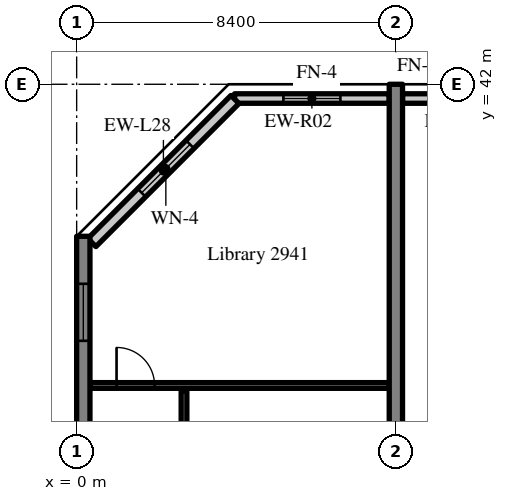
"""IFC4 building model, lengths in metres.
Left out: names, types, materials, properties, quantities, classifications, styles, units other than length and angle.
Written with IfcOpenShell. Run it as: python <this file> out.ifc"""

import sys

from ifc_helpers import new_model, si_unit, direction, frame, frame_2d, origin, place, context, subcontext, project, spatial, rectangle, extrude, source, transform, mapped, element, fill, save


model = new_model("IFC4")
c1 = context("Model", 3, precision=1e-05, world=origin(), true_north=direction((0.0, 1.0)))
c2 = subcontext(c1, "Body", "Model", "MODEL_VIEW")
j1 = project(units=[si_unit("LENGTHUNIT", "METRE"), si_unit("PLANEANGLEUNIT", "RADIAN")], contexts=[c1])
p1 = place(None, origin())
s1 = spatial("IfcSite", under=j1, at=p1, CompositionType="ELEMENT")
p2 = place(p1, origin())
s2 = spatial("IfcBuilding", under=s1, at=p2, CompositionType="ELEMENT")
p3 = place(p2, frame((0.0, 0.0, 121.8)))
s3 = spatial("IfcBuildingStorey", under=s2, at=p3, CompositionType="ELEMENT", Elevation=121.8)
m1 = source(origin(), c2, "Body", "SweptSolid", [
    extrude(rectangle(XDim=16.0, YDim=0.35, at=frame_2d((8.0, 0.0))), origin(), (0.0, 0.0, 1.0), 3.52),
])
p4 = place(p3, frame((0.175, 22.0, 0.0), z_axis=(0.0, 0.0, 1.0), x_axis=(0.0, 1.0, 0.0)))
e1 = element("IfcWall", 1, at=p4, inside=s3, PredefinedType="SHEAR", context=c2, shape_type="MappedRepresentation", body=[
    mapped(m1, transform((0.0, 0.0, 0.0), scale=1.0)),
])
m2 = source(origin(), c2, "Body", "SweptSolid", [
    extrude(rectangle(XDim=1.5, YDim=1.5, at=frame_2d((0.75, 0.75))), frame((0.0, 0.185, 0.0), z_axis=(0.0, -1.0, 0.0), x_axis=(1.0, 0.0, 0.0)), (0.0, 0.0, 1.0), 0.37),
])
p5 = place(p4, frame((1.25, 0.0, 0.9)))
e2 = element("IfcOpeningElement", 2, at=p5, cuts=e1, PredefinedType="OPENING", context=c2, shape_type="MappedRepresentation", body=[
    mapped(m2, transform((0.0, 0.0, 0.0), scale=1.0)),
])
p6 = place(p4, frame((5.25, 0.0, 0.9)))
e3 = element("IfcOpeningElement", 3, at=p6, cuts=e1, PredefinedType="OPENING", context=c2, shape_type="MappedRepresentation", body=[
    mapped(m2, transform((0.0, 0.0, 0.0), scale=1.0)),
])
p7 = place(p4, frame((9.25, 0.0, 0.9)))
e4 = element("IfcOpeningElement", 4, at=p7, cuts=e1, PredefinedType="OPENING", context=c2, shape_type="MappedRepresentation", body=[
    mapped(m2, transform((0.0, 0.0, 0.0), scale=1.0)),
])
p8 = place(p4, frame((13.25, 0.0, 0.9)))
e5 = element("IfcOpeningElement", 5, at=p8, cuts=e1, PredefinedType="OPENING", context=c2, shape_type="MappedRepresentation", body=[
    mapped(m2, transform((0.0, 0.0, 0.0), scale=1.0)),
])
m3 = source(origin(), c2, "Body", "SweptSolid", [
    extrude(rectangle(XDim=20.0, YDim=0.35, at=frame_2d((10.0, 0.0))), origin(), (0.0, 0.0, 1.0), 3.52),
])
p9 = place(p3, frame((8.4, 22.0, 0.0), z_axis=(0.0, 0.0, 1.0), x_axis=(0.0, 1.0, 0.0)))
e6 = element("IfcWall", 6, at=p9, inside=s3, PredefinedType="SHEAR", context=c2, shape_type="MappedRepresentation", body=[
    mapped(m3, transform((0.0, 0.0, 0.0), scale=1.0)),
])
m4 = source(origin(), c2, "Body", "SweptSolid", [
    extrude(rectangle(XDim=4.07, YDim=0.25, at=frame_2d((2.035, 0.0))), origin(), (0.0, 0.0, 1.0), 2.82),
])
p10 = place(p3, frame((8.225, 41.625, 0.0), z_axis=(0.0, 0.0, 1.0), x_axis=(-1.0, 0.0, 0.0)))
e7 = element("IfcWall", 7, at=p10, inside=s3, PredefinedType="SOLIDWALL", context=c2, shape_type="MappedRepresentation", body=[
    mapped(m4, transform((0.0, 0.0, 0.0), scale=1.0)),
])
m5 = source(origin(), c2, "Body", "SweptSolid", [
    extrude(rectangle(XDim=1.5, YDim=1.5, at=frame_2d((0.75, 0.75))), frame((0.0, 0.135, 0.0), z_axis=(0.0, -1.0, 0.0), x_axis=(1.0, 0.0, 0.0)), (0.0, 0.0, 1.0), 0.27),
])
p11 = place(p10, frame((1.285, 0.0, 0.9)))
e8 = element("IfcOpeningElement", 8, at=p11, cuts=e7, PredefinedType="OPENING", context=c2, shape_type="MappedRepresentation", body=[
    mapped(m5, transform((0.0, 0.0, 0.0), scale=1.0)),
])
m6 = source(origin(), c2, "Body", "SweptSolid", [
    extrude(rectangle(XDim=3.675, YDim=0.25, at=frame_2d((1.837, 0.0))), origin(), (0.0, 0.0, 1.0), 2.82),
])
p12 = place(p3, frame((12.25, 41.625, 0.0), z_axis=(0.0, 0.0, 1.0), x_axis=(-1.0, 0.0, 0.0)))
e9 = element("IfcWall", 9, at=p12, inside=s3, PredefinedType="SOLIDWALL", context=c2, shape_type="MappedRepresentation", body=[
    mapped(m6, transform((0.0, 0.0, 0.0), scale=1.0)),
])
p13 = place(p12, frame((1.087, 0.0, 0.9)))
e10 = element("IfcOpeningElement", 10, at=p13, cuts=e9, PredefinedType="OPENING", context=c2, shape_type="MappedRepresentation", body=[
    mapped(m5, transform((0.0, 0.0, 0.0), scale=1.0)),
])
m7 = source(origin(), c2, "Body", "SweptSolid", [
    extrude(rectangle(XDim=5.326, YDim=0.3, at=frame_2d((2.663, 0.0))), origin(), (0.0, 0.0, 1.0), 3.52),
])
p14 = place(p3, frame((4.166, 41.6, 0.0), z_axis=(0.0, 0.0, 1.0), x_axis=(-0.707106781187, -0.707106781187, 0.0)))
e11 = element("IfcWall", 11, at=p14, inside=s3, PredefinedType="SOLIDWALL", context=c2, shape_type="MappedRepresentation", body=[
    mapped(m7, transform((0.0, 0.0, 0.0), scale=1.0)),
])
m8 = source(origin(), c2, "Body", "SweptSolid", [
    extrude(rectangle(XDim=1.8, YDim=1.5, at=frame_2d((0.9, 0.75))), frame((0.0, 0.16, 0.0), z_axis=(0.0, -1.0, 0.0), x_axis=(1.0, 0.0, 0.0)), (0.0, 0.0, 1.0), 0.32),
])
p15 = place(p14, frame((1.672, 0.0, 0.9)))
e12 = element("IfcOpeningElement", 12, at=p15, cuts=e11, PredefinedType="OPENING", context=c2, shape_type="MappedRepresentation", body=[
    mapped(m8, transform((0.0, 0.0, 0.0), scale=1.0)),
])
m9 = source(origin(), c2, "Body", "SweptSolid", [
    extrude(rectangle(XDim=3.85, YDim=0.15, at=frame_2d((1.925, 0.0))), origin(), (0.0, 0.0, 1.0), 3.52),
])
p16 = place(p3, frame((2.825, 30.075, 0.0), z_axis=(0.0, 0.0, 1.0), x_axis=(0.0, 1.0, 0.0)))
e13 = element("IfcWall", 13, at=p16, inside=s3, PredefinedType="PARTITIONING", context=c2, shape_type="MappedRepresentation", body=[
    mapped(m9, transform((0.0, 0.0, 0.0), scale=1.0)),
])
m10 = source(origin(), c2, "Body", "SweptSolid", [
    extrude(rectangle(XDim=1.0, YDim=2.1, at=frame_2d((0.5, 1.05))), frame((0.0, 0.085, 0.0), z_axis=(0.0, -1.0, 0.0), x_axis=(1.0, 0.0, 0.0)), (0.0, 0.0, 1.0), 0.17),
])
p17 = place(p16, frame((1.425, 0.0, 0.0)))
e14 = element("IfcOpeningElement", 14, at=p17, cuts=e13, PredefinedType="OPENING", context=c2, shape_type="MappedRepresentation", body=[
    mapped(m10, transform((0.0, 0.0, 0.0), scale=1.0)),
])
m11 = source(origin(), c2, "Body", "SweptSolid", [
    extrude(rectangle(XDim=7.875, YDim=0.15, at=frame_2d((3.938, 0.0))), origin(), (0.0, 0.0, 1.0), 3.52),
])
p18 = place(p3, frame((0.35, 34.075, 0.0), z_axis=(0.0, 0.0, 1.0), x_axis=(1.0, 0.0, 0.0)))
e15 = element("IfcWall", 15, at=p18, inside=s3, PredefinedType="PARTITIONING", context=c2, shape_type="MappedRepresentation", body=[
    mapped(m11, transform((0.0, 0.0, 0.0), scale=1.0)),
])
p19 = place(p18, frame((0.7, 0.0, 0.0)))
e16 = element("IfcOpeningElement", 16, at=p19, cuts=e15, PredefinedType="OPENING", context=c2, shape_type="MappedRepresentation", body=[
    mapped(m10, transform((0.0, 0.0, 0.0), scale=1.0)),
])
m12 = source(origin(), c2, "Body", "SweptSolid", [
    extrude(rectangle(XDim=1.5, YDim=1.5, at=frame_2d((0.75, 0.75))), frame((0.0, 0.03, 0.0), z_axis=(0.0, -1.0, 0.0), x_axis=(1.0, 0.0, 0.0)), (0.0, 0.0, 1.0), 0.06),
])
p20 = place(p11, origin())
e17 = element("IfcWindow", 17, at=p20, inside=s3, PartitioningType="SINGLE_PANEL", PredefinedType="WINDOW", context=c2, shape_type="MappedRepresentation", body=[
    mapped(m12, transform((0.0, 0.0, 0.0), scale=1.0)),
])
fill(e8, e17)
m13 = source(origin(), c2, "Body", "SweptSolid", [
    extrude(rectangle(XDim=1.8, YDim=1.5, at=frame_2d((0.9, 0.75))), frame((0.0, 0.03, 0.0), z_axis=(0.0, -1.0, 0.0), x_axis=(1.0, 0.0, 0.0)), (0.0, 0.0, 1.0), 0.06),
])
p21 = place(p15, origin())
e18 = element("IfcWindow", 18, at=p21, inside=s3, PartitioningType="SINGLE_PANEL", PredefinedType="WINDOW", context=c2, shape_type="MappedRepresentation", body=[
    mapped(m13, transform((0.0, 0.0, 0.0), scale=1.0)),
])
fill(e12, e18)
p22 = place(p8, origin())
e19 = element("IfcWindow", 19, at=p22, inside=s3, PartitioningType="SINGLE_PANEL", PredefinedType="WINDOW", context=c2, shape_type="MappedRepresentation", body=[
    mapped(m12, transform((0.0, 0.0, 0.0), scale=1.0)),
])
fill(e5, e19)
m14 = source(origin(), c2, "Body", "SweptSolid", [
    extrude(rectangle(XDim=1.0, YDim=2.1, at=frame_2d((0.5, 1.05))), frame((0.0, 0.025, 0.0), z_axis=(0.0, -1.0, 0.0), x_axis=(1.0, 0.0, 0.0)), (0.0, 0.0, 1.0), 0.05),
])
p23 = place(p19, origin())
e20 = element("IfcDoor", 20, at=p23, inside=s3, OperationType="SINGLE_SWING_LEFT", PredefinedType="DOOR", context=c2, shape_type="MappedRepresentation", body=[
    mapped(m14, transform((0.0, 0.0, 0.0), scale=1.0)),
])
fill(e16, e20)
save(model, sys.argv[1])
